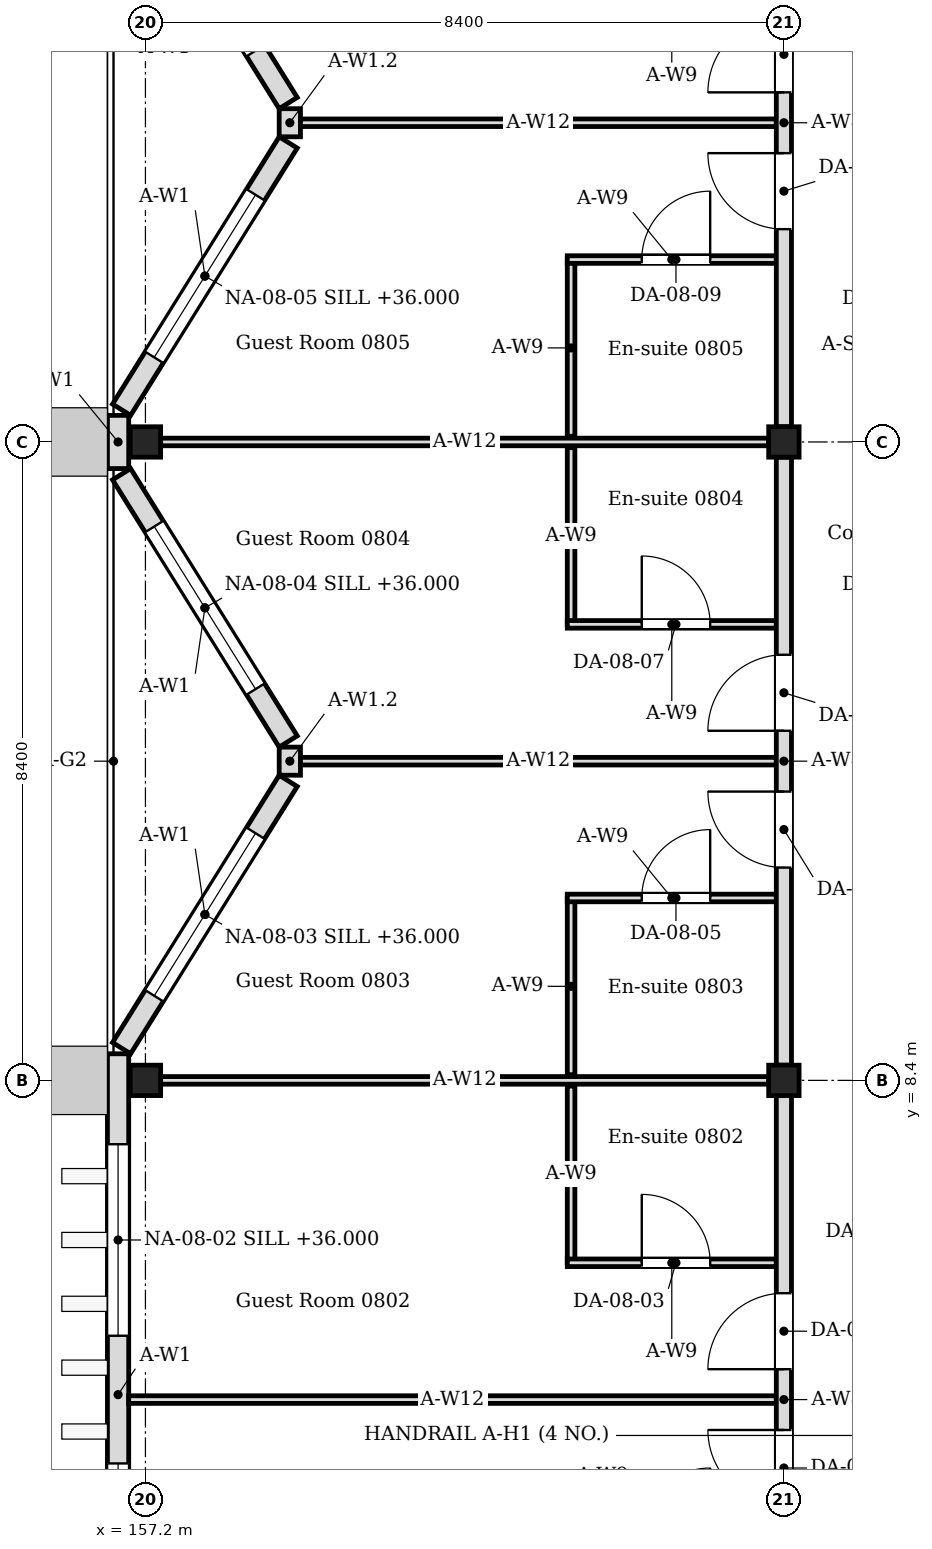
"""IFC4 building model, lengths in metres.
Left out: names, types, materials, properties, quantities, classifications, styles, units other than length and angle.
Written with IfcOpenShell. Run it as: python <this file> out.ifc"""

import sys

from ifc_helpers import new_model, si_unit, direction, frame, frame_2d, origin, origin_2d, place, context, subcontext, project, spatial, rectangle, i_section, extrude, element, fill, save


model = new_model("IFC4")
c1 = context("Model", 3, precision=1e-05, world=origin(), true_north=direction((0.0, 1.0)))
c2 = subcontext(c1, "Body", "Model", "MODEL_VIEW")
j1 = project(units=[si_unit("LENGTHUNIT", "METRE"), si_unit("PLANEANGLEUNIT", "RADIAN")], contexts=[c1])
p1 = place(None, origin())
s1 = spatial("IfcSite", under=j1, at=p1, CompositionType="ELEMENT")
p2 = place(p1, origin())
s2 = spatial("IfcBuilding", under=s1, at=p2, CompositionType="ELEMENT")
p3 = place(p2, frame((0.0, 0.0, 35.4)))
s3 = spatial("IfcBuildingStorey", under=s2, at=p3, CompositionType="ELEMENT", Elevation=35.4)
for number, where, z_axis, x_axis in (
    (1, (157.2, 8.4, 0.0), (0.0, 0.0, 1.0), (1.0, 0.0, 0.0)),
    (2, (157.2, 16.8, 0.0), (0.0, 0.0, 1.0), (1.0, 0.0, 0.0)),
    (3, (165.6, 8.4, 0.0), (0.0, 0.0, 1.0), (1.0, 0.0, 0.0)),
    (4, (165.6, 16.8, 0.0), (0.0, 0.0, 1.0), (1.0, 0.0, 0.0)),
):
    element("IfcColumn", number, at=place(p3, frame(where, z_axis=z_axis, x_axis=x_axis)), inside=s3, PredefinedType="COLUMN", context=c2, shape_type="SweptSolid", body=[
        extrude(i_section(OverallWidth=0.4, OverallDepth=0.4, WebThickness=0.013, FlangeThickness=0.021, FilletRadius=0.022, at=origin_2d()), origin(), (0.0, 0.0, 1.0), 4.2),
    ])
p4 = place(p3, frame((156.84, -0.22, 0.0), z_axis=(0.0, 0.0, 1.0), x_axis=(0.0, 1.0, 0.0)))
e5 = element("IfcWall", 5, at=p4, inside=s3, PredefinedType="SOLIDWALL", context=c2, shape_type="SweptSolid", body=[
    extrude(rectangle(XDim=8.97, YDim=0.28, at=frame_2d((4.485, 0.0))), origin(), (0.0, 0.0, 1.0), 4.05),
])
p5 = place(p4, frame((1.06, 0.0, 0.6)))
e6 = element("IfcOpeningElement", 6, at=p5, cuts=e5, PredefinedType="OPENING", context=c2, shape_type="SweptSolid", body=[
    extrude(rectangle(XDim=2.52, YDim=2.4, at=frame_2d((1.26, 1.2))), frame((0.0, 0.15, 0.0), z_axis=(0.0, -1.0, 0.0), x_axis=(1.0, 0.0, 0.0)), (0.0, 0.0, 1.0), 0.3),
])
p6 = place(p4, frame((5.26, 0.0, 0.6)))
e7 = element("IfcOpeningElement", 7, at=p6, cuts=e5, PredefinedType="OPENING", context=c2, shape_type="SweptSolid", body=[
    extrude(rectangle(XDim=2.52, YDim=2.4, at=frame_2d((1.26, 1.2))), frame((0.0, 0.15, 0.0), z_axis=(0.0, -1.0, 0.0), x_axis=(1.0, 0.0, 0.0)), (0.0, 0.0, 1.0), 0.3),
])
p7 = place(p3, frame((156.886, 8.824, 0.0), z_axis=(0.0, 0.0, 1.0), x_axis=(0.529018946142, 0.848610013271, 0.0)))
e8 = element("IfcWall", 8, at=p7, inside=s3, PredefinedType="SOLIDWALL", context=c2, shape_type="SweptSolid", body=[
    extrude(rectangle(XDim=4.144, YDim=0.28, at=frame_2d((2.072, 0.0))), origin(), (0.0, 0.0, 1.0), 4.05),
])
p8 = place(p7, frame((0.812, 0.0, 0.6)))
e9 = element("IfcOpeningElement", 9, at=p8, cuts=e8, PredefinedType="OPENING", context=c2, shape_type="SweptSolid", body=[
    extrude(rectangle(XDim=2.52, YDim=2.4, at=frame_2d((1.26, 1.2))), frame((0.0, 0.15, 0.0), z_axis=(0.0, -1.0, 0.0), x_axis=(1.0, 0.0, 0.0)), (0.0, 0.0, 1.0), 0.3),
])
p9 = place(p3, frame((159.079, 12.859, 0.0), z_axis=(0.0, 0.0, 1.0), x_axis=(-0.528992500338, 0.848626498871, 0.0)))
e10 = element("IfcWall", 10, at=p9, inside=s3, PredefinedType="SOLIDWALL", context=c2, shape_type="SweptSolid", body=[
    extrude(rectangle(XDim=4.145, YDim=0.28, at=frame_2d((2.072, 0.0))), origin(), (0.0, 0.0, 1.0), 4.05),
])
p10 = place(p9, frame((0.812, 0.0, 0.6)))
e11 = element("IfcOpeningElement", 11, at=p10, cuts=e10, PredefinedType="OPENING", context=c2, shape_type="SweptSolid", body=[
    extrude(rectangle(XDim=2.52, YDim=2.4, at=frame_2d((1.26, 1.2))), frame((0.0, 0.15, 0.0), z_axis=(0.0, -1.0, 0.0), x_axis=(1.0, 0.0, 0.0)), (0.0, 0.0, 1.0), 0.3),
])
p11 = place(p3, frame((159.1, 12.415, 0.0), z_axis=(0.0, 0.0, 1.0), x_axis=(0.0, 1.0, 0.0)))
e12 = element("IfcWall", 12, at=p11, inside=s3, PredefinedType="SOLIDWALL", context=c2, shape_type="SweptSolid", body=[
    extrude(rectangle(XDim=0.37, YDim=0.28, at=frame_2d((0.185, 0.0))), origin(), (0.0, 0.0, 1.0), 3.604),
])
p12 = place(p3, frame((156.84, 16.45, 0.0), z_axis=(0.0, 0.0, 1.0), x_axis=(0.0, 1.0, 0.0)))
e13 = element("IfcWall", 13, at=p12, inside=s3, PredefinedType="SOLIDWALL", context=c2, shape_type="SweptSolid", body=[
    extrude(rectangle(XDim=0.7, YDim=0.28, at=frame_2d((0.35, 0.0))), origin(), (0.0, 0.0, 1.0), 4.05),
])
p13 = place(p3, frame((156.886, 17.224, 0.0), z_axis=(0.0, 0.0, 1.0), x_axis=(0.529018946142, 0.848610013271, 0.0)))
e14 = element("IfcWall", 14, at=p13, inside=s3, PredefinedType="SOLIDWALL", context=c2, shape_type="SweptSolid", body=[
    extrude(rectangle(XDim=4.144, YDim=0.28, at=frame_2d((2.072, 0.0))), origin(), (0.0, 0.0, 1.0), 4.05),
])
p14 = place(p13, frame((0.812, 0.0, 0.6)))
e15 = element("IfcOpeningElement", 15, at=p14, cuts=e14, PredefinedType="OPENING", context=c2, shape_type="SweptSolid", body=[
    extrude(rectangle(XDim=2.52, YDim=2.4, at=frame_2d((1.26, 1.2))), frame((0.0, 0.15, 0.0), z_axis=(0.0, -1.0, 0.0), x_axis=(1.0, 0.0, 0.0)), (0.0, 0.0, 1.0), 0.3),
])
p15 = place(p3, frame((159.079, 21.259, 0.0), z_axis=(0.0, 0.0, 1.0), x_axis=(-0.529018946142, 0.848610013271, 0.0)))
e16 = element("IfcWall", 16, at=p15, inside=s3, PredefinedType="SOLIDWALL", context=c2, shape_type="SweptSolid", body=[
    extrude(rectangle(XDim=4.144, YDim=0.28, at=frame_2d((2.072, 0.0))), origin(), (0.0, 0.0, 1.0), 4.05),
])
p16 = place(p15, frame((0.812, 0.0, 0.6)))
e17 = element("IfcOpeningElement", 17, at=p16, cuts=e16, PredefinedType="OPENING", context=c2, shape_type="SweptSolid", body=[
    extrude(rectangle(XDim=2.52, YDim=2.4, at=frame_2d((1.26, 1.2))), frame((0.0, 0.15, 0.0), z_axis=(0.0, -1.0, 0.0), x_axis=(1.0, 0.0, 0.0)), (0.0, 0.0, 1.0), 0.3),
])
p17 = place(p3, frame((159.1, 20.815, 0.0), z_axis=(0.0, 0.0, 1.0), x_axis=(0.0, 1.0, 0.0)))
e18 = element("IfcWall", 18, at=p17, inside=s3, PredefinedType="SOLIDWALL", context=c2, shape_type="SweptSolid", body=[
    extrude(rectangle(XDim=0.37, YDim=0.28, at=frame_2d((0.185, 0.0))), origin(), (0.0, 0.0, 1.0), 3.604),
])
p18 = place(p3, frame((162.8, 6.0, 0.0), z_axis=(0.0, 0.0, 1.0), x_axis=(0.0, 1.0, 0.0)))
e19 = element("IfcWall", 19, at=p18, inside=s3, PredefinedType="PARTITIONING", context=c2, shape_type="SweptSolid", body=[
    extrude(rectangle(XDim=2.325, YDim=0.1, at=frame_2d((1.163, 0.0))), origin(), (0.0, 0.0, 1.0), 4.05),
])
p19 = place(p3, frame((162.75, 6.0, 0.0), z_axis=(0.0, 0.0, 1.0), x_axis=(1.0, 0.0, 0.0)))
e20 = element("IfcWall", 20, at=p19, inside=s3, PredefinedType="PARTITIONING", context=c2, shape_type="SweptSolid", body=[
    extrude(rectangle(XDim=2.75, YDim=0.1, at=frame_2d((1.375, 0.0))), origin(), (0.0, 0.0, 1.0), 4.05),
])
p20 = place(p19, frame((0.98, 0.0, 0.0)))
e21 = element("IfcOpeningElement", 21, at=p20, cuts=e20, PredefinedType="OPENING", context=c2, shape_type="SweptSolid", body=[
    extrude(rectangle(XDim=0.9, YDim=2.1, at=frame_2d((0.45, 1.05))), frame((0.0, 0.06, 0.0), z_axis=(0.0, -1.0, 0.0), x_axis=(1.0, 0.0, 0.0)), (0.0, 0.0, 1.0), 0.12),
])
p21 = place(p3, frame((162.8, 8.475, 0.0), z_axis=(0.0, 0.0, 1.0), x_axis=(0.0, 1.0, 0.0)))
e22 = element("IfcWall", 22, at=p21, inside=s3, PredefinedType="PARTITIONING", context=c2, shape_type="SweptSolid", body=[
    extrude(rectangle(XDim=2.325, YDim=0.1, at=frame_2d((1.163, 0.0))), origin(), (0.0, 0.0, 1.0), 4.05),
])
p22 = place(p3, frame((162.75, 10.8, 0.0), z_axis=(0.0, 0.0, 1.0), x_axis=(1.0, 0.0, 0.0)))
e23 = element("IfcWall", 23, at=p22, inside=s3, PredefinedType="PARTITIONING", context=c2, shape_type="SweptSolid", body=[
    extrude(rectangle(XDim=2.75, YDim=0.1, at=frame_2d((1.375, 0.0))), origin(), (0.0, 0.0, 1.0), 4.05),
])
p23 = place(p22, frame((0.98, 0.0, 0.0)))
e24 = element("IfcOpeningElement", 24, at=p23, cuts=e23, PredefinedType="OPENING", context=c2, shape_type="SweptSolid", body=[
    extrude(rectangle(XDim=0.9, YDim=2.1, at=frame_2d((0.45, 1.05))), frame((0.0, 0.06, 0.0), z_axis=(0.0, -1.0, 0.0), x_axis=(1.0, 0.0, 0.0)), (0.0, 0.0, 1.0), 0.12),
])
p24 = place(p3, frame((162.8, 14.4, 0.0), z_axis=(0.0, 0.0, 1.0), x_axis=(0.0, 1.0, 0.0)))
e25 = element("IfcWall", 25, at=p24, inside=s3, PredefinedType="PARTITIONING", context=c2, shape_type="SweptSolid", body=[
    extrude(rectangle(XDim=2.325, YDim=0.1, at=frame_2d((1.163, 0.0))), origin(), (0.0, 0.0, 1.0), 4.05),
])
p25 = place(p3, frame((162.75, 14.4, 0.0), z_axis=(0.0, 0.0, 1.0), x_axis=(1.0, 0.0, 0.0)))
e26 = element("IfcWall", 26, at=p25, inside=s3, PredefinedType="PARTITIONING", context=c2, shape_type="SweptSolid", body=[
    extrude(rectangle(XDim=2.75, YDim=0.1, at=frame_2d((1.375, 0.0))), origin(), (0.0, 0.0, 1.0), 4.05),
])
p26 = place(p25, frame((0.98, 0.0, 0.0)))
e27 = element("IfcOpeningElement", 27, at=p26, cuts=e26, PredefinedType="OPENING", context=c2, shape_type="SweptSolid", body=[
    extrude(rectangle(XDim=0.9, YDim=2.1, at=frame_2d((0.45, 1.05))), frame((0.0, 0.06, 0.0), z_axis=(0.0, -1.0, 0.0), x_axis=(1.0, 0.0, 0.0)), (0.0, 0.0, 1.0), 0.12),
])
p27 = place(p3, frame((162.8, 16.875, 0.0), z_axis=(0.0, 0.0, 1.0), x_axis=(0.0, 1.0, 0.0)))
e28 = element("IfcWall", 28, at=p27, inside=s3, PredefinedType="PARTITIONING", context=c2, shape_type="SweptSolid", body=[
    extrude(rectangle(XDim=2.325, YDim=0.1, at=frame_2d((1.163, 0.0))), origin(), (0.0, 0.0, 1.0), 4.05),
])
p28 = place(p3, frame((162.75, 19.2, 0.0), z_axis=(0.0, 0.0, 1.0), x_axis=(1.0, 0.0, 0.0)))
e29 = element("IfcWall", 29, at=p28, inside=s3, PredefinedType="PARTITIONING", context=c2, shape_type="SweptSolid", body=[
    extrude(rectangle(XDim=2.75, YDim=0.1, at=frame_2d((1.375, 0.0))), origin(), (0.0, 0.0, 1.0), 4.05),
])
p29 = place(p28, frame((0.98, 0.0, 0.0)))
e30 = element("IfcOpeningElement", 30, at=p29, cuts=e29, PredefinedType="OPENING", context=c2, shape_type="SweptSolid", body=[
    extrude(rectangle(XDim=0.9, YDim=2.1, at=frame_2d((0.45, 1.05))), frame((0.0, 0.06, 0.0), z_axis=(0.0, -1.0, 0.0), x_axis=(1.0, 0.0, 0.0)), (0.0, 0.0, 1.0), 0.12),
])
for number, where, z_axis, x_axis in (
    (31, (157.4, 8.4, 0.0), (0.0, 0.0, 1.0), (1.0, 0.0, 0.0)),
    (32, (157.4, 16.8, 0.0), (0.0, 0.0, 1.0), (1.0, 0.0, 0.0)),
):
    element("IfcWall", number, at=place(p3, frame(where, z_axis=z_axis, x_axis=x_axis)), inside=s3, PredefinedType="PARTITIONING", context=c2, shape_type="SweptSolid", body=[
        extrude(rectangle(XDim=8.0, YDim=0.1, at=frame_2d((4.0, 0.0))), origin(), (0.0, 0.0, 1.0), 3.604),
    ])
p30 = place(p3, frame((156.98, 4.2, 0.0), z_axis=(0.0, 0.0, 1.0), x_axis=(1.0, 0.0, 0.0)))
e33 = element("IfcWall", 33, at=p30, inside=s3, PredefinedType="PARTITIONING", context=c2, shape_type="SweptSolid", body=[
    extrude(rectangle(XDim=8.52, YDim=0.1, at=frame_2d((4.26, 0.0))), origin(), (0.0, 0.0, 1.0), 3.604),
])
for number, where, z_axis, x_axis in (
    (34, (159.24, 12.6, 0.0), (0.0, 0.0, 1.0), (1.0, 0.0, 0.0)),
    (35, (159.24, 21.0, 0.0), (0.0, 0.0, 1.0), (1.0, 0.0, 0.0)),
):
    element("IfcWall", number, at=place(p3, frame(where, z_axis=z_axis, x_axis=x_axis)), inside=s3, PredefinedType="PARTITIONING", context=c2, shape_type="SweptSolid", body=[
        extrude(rectangle(XDim=6.26, YDim=0.1, at=frame_2d((3.13, 0.0))), origin(), (0.0, 0.0, 1.0), 3.604),
    ])
p31 = place(p3, frame((165.6, 0.2, 0.0), z_axis=(0.0, 0.0, 1.0), x_axis=(0.0, 1.0, 0.0)))
e36 = element("IfcWall", 36, at=p31, inside=s3, PredefinedType="PARTITIONING", context=c2, shape_type="SweptSolid", body=[
    extrude(rectangle(XDim=8.0, YDim=0.2, at=frame_2d((4.0, 0.0))), origin(), (0.0, 0.0, 1.0), 3.45),
])
p32 = place(p31, frame((2.6, 0.0, 0.0)))
e37 = element("IfcOpeningElement", 37, at=p32, cuts=e36, PredefinedType="OPENING", context=c2, shape_type="SweptSolid", body=[
    extrude(rectangle(XDim=1.0, YDim=2.4, at=frame_2d((0.5, 1.2))), frame((0.0, 0.11, 0.0), z_axis=(0.0, -1.0, 0.0), x_axis=(1.0, 0.0, 0.0)), (0.0, 0.0, 1.0), 0.22),
])
p33 = place(p31, frame((4.4, 0.0, 0.0)))
e38 = element("IfcOpeningElement", 38, at=p33, cuts=e36, PredefinedType="OPENING", context=c2, shape_type="SweptSolid", body=[
    extrude(rectangle(XDim=1.0, YDim=2.4, at=frame_2d((0.5, 1.2))), frame((0.0, 0.11, 0.0), z_axis=(0.0, -1.0, 0.0), x_axis=(1.0, 0.0, 0.0)), (0.0, 0.0, 1.0), 0.22),
])
p34 = place(p3, frame((165.6, 8.6, 0.0), z_axis=(0.0, 0.0, 1.0), x_axis=(0.0, 1.0, 0.0)))
e39 = element("IfcWall", 39, at=p34, inside=s3, PredefinedType="PARTITIONING", context=c2, shape_type="SweptSolid", body=[
    extrude(rectangle(XDim=8.0, YDim=0.2, at=frame_2d((4.0, 0.0))), origin(), (0.0, 0.0, 1.0), 3.45),
])
p35 = place(p34, frame((2.6, 0.0, 0.0)))
e40 = element("IfcOpeningElement", 40, at=p35, cuts=e39, PredefinedType="OPENING", context=c2, shape_type="SweptSolid", body=[
    extrude(rectangle(XDim=1.0, YDim=2.4, at=frame_2d((0.5, 1.2))), frame((0.0, 0.11, 0.0), z_axis=(0.0, -1.0, 0.0), x_axis=(1.0, 0.0, 0.0)), (0.0, 0.0, 1.0), 0.22),
])
p36 = place(p34, frame((4.4, 0.0, 0.0)))
e41 = element("IfcOpeningElement", 41, at=p36, cuts=e39, PredefinedType="OPENING", context=c2, shape_type="SweptSolid", body=[
    extrude(rectangle(XDim=1.0, YDim=2.4, at=frame_2d((0.5, 1.2))), frame((0.0, 0.11, 0.0), z_axis=(0.0, -1.0, 0.0), x_axis=(1.0, 0.0, 0.0)), (0.0, 0.0, 1.0), 0.22),
])
p37 = place(p3, frame((165.6, 17.0, 0.0), z_axis=(0.0, 0.0, 1.0), x_axis=(0.0, 1.0, 0.0)))
e42 = element("IfcWall", 42, at=p37, inside=s3, PredefinedType="PARTITIONING", context=c2, shape_type="SweptSolid", body=[
    extrude(rectangle(XDim=8.0, YDim=0.2, at=frame_2d((4.0, 0.0))), origin(), (0.0, 0.0, 1.0), 3.45),
])
p38 = place(p37, frame((2.6, 0.0, 0.0)))
e43 = element("IfcOpeningElement", 43, at=p38, cuts=e42, PredefinedType="OPENING", context=c2, shape_type="SweptSolid", body=[
    extrude(rectangle(XDim=1.0, YDim=2.4, at=frame_2d((0.5, 1.2))), frame((0.0, 0.11, 0.0), z_axis=(0.0, -1.0, 0.0), x_axis=(1.0, 0.0, 0.0)), (0.0, 0.0, 1.0), 0.22),
])
p39 = place(p37, frame((4.4, 0.0, 0.0)))
e44 = element("IfcOpeningElement", 44, at=p39, cuts=e42, PredefinedType="OPENING", context=c2, shape_type="SweptSolid", body=[
    extrude(rectangle(XDim=1.0, YDim=2.4, at=frame_2d((0.5, 1.2))), frame((0.0, 0.11, 0.0), z_axis=(0.0, -1.0, 0.0), x_axis=(1.0, 0.0, 0.0)), (0.0, 0.0, 1.0), 0.22),
])
p40 = place(p5, origin())
e45 = element("IfcWindow", 45, at=p40, inside=s3, PartitioningType="SINGLE_PANEL", PredefinedType="WINDOW", context=c2, shape_type="SweptSolid", body=[
    extrude(rectangle(XDim=2.52, YDim=2.4, at=frame_2d((1.26, 1.2))), frame((0.0, 0.03, 0.0), z_axis=(0.0, -1.0, 0.0), x_axis=(1.0, 0.0, 0.0)), (0.0, 0.0, 1.0), 0.06),
])
fill(e6, e45)
p41 = place(p6, origin())
e46 = element("IfcWindow", 46, at=p41, inside=s3, PartitioningType="SINGLE_PANEL", PredefinedType="WINDOW", context=c2, shape_type="SweptSolid", body=[
    extrude(rectangle(XDim=2.52, YDim=2.4, at=frame_2d((1.26, 1.2))), frame((0.0, 0.03, 0.0), z_axis=(0.0, -1.0, 0.0), x_axis=(1.0, 0.0, 0.0)), (0.0, 0.0, 1.0), 0.06),
])
fill(e7, e46)
p42 = place(p8, origin())
e47 = element("IfcWindow", 47, at=p42, inside=s3, PartitioningType="SINGLE_PANEL", PredefinedType="WINDOW", context=c2, shape_type="SweptSolid", body=[
    extrude(rectangle(XDim=2.52, YDim=2.4, at=frame_2d((1.26, 1.2))), frame((0.0, 0.03, 0.0), z_axis=(0.0, -1.0, 0.0), x_axis=(1.0, 0.0, 0.0)), (0.0, 0.0, 1.0), 0.06),
])
fill(e9, e47)
p43 = place(p10, origin())
e48 = element("IfcWindow", 48, at=p43, inside=s3, PartitioningType="SINGLE_PANEL", PredefinedType="WINDOW", context=c2, shape_type="SweptSolid", body=[
    extrude(rectangle(XDim=2.52, YDim=2.4, at=frame_2d((1.26, 1.2))), frame((0.0, 0.03, 0.0), z_axis=(0.0, -1.0, 0.0), x_axis=(1.0, 0.0, 0.0)), (0.0, 0.0, 1.0), 0.06),
])
fill(e11, e48)
p44 = place(p14, origin())
e49 = element("IfcWindow", 49, at=p44, inside=s3, PartitioningType="SINGLE_PANEL", PredefinedType="WINDOW", context=c2, shape_type="SweptSolid", body=[
    extrude(rectangle(XDim=2.52, YDim=2.4, at=frame_2d((1.26, 1.2))), frame((0.0, 0.03, 0.0), z_axis=(0.0, -1.0, 0.0), x_axis=(1.0, 0.0, 0.0)), (0.0, 0.0, 1.0), 0.06),
])
fill(e15, e49)
p45 = place(p32, origin())
e50 = element("IfcDoor", 50, at=p45, inside=s3, OperationType="SINGLE_SWING_RIGHT", PredefinedType="DOOR", context=c2, shape_type="SweptSolid", body=[
    extrude(rectangle(XDim=1.0, YDim=2.4, at=frame_2d((0.5, 1.2))), frame((0.0, 0.025, 0.0), z_axis=(0.0, -1.0, 0.0), x_axis=(1.0, 0.0, 0.0)), (0.0, 0.0, 1.0), 0.05),
])
fill(e37, e50)
p46 = place(p20, origin())
e51 = element("IfcDoor", 51, at=p46, inside=s3, OperationType="SINGLE_SWING_LEFT", PredefinedType="DOOR", context=c2, shape_type="SweptSolid", body=[
    extrude(rectangle(XDim=0.9, YDim=2.1, at=frame_2d((0.45, 1.05))), frame((0.0, 0.025, 0.0), z_axis=(0.0, -1.0, 0.0), x_axis=(1.0, 0.0, 0.0)), (0.0, 0.0, 1.0), 0.05),
])
fill(e21, e51)
p47 = place(p33, origin())
e52 = element("IfcDoor", 52, at=p47, inside=s3, OperationType="SINGLE_SWING_LEFT", PredefinedType="DOOR", context=c2, shape_type="SweptSolid", body=[
    extrude(rectangle(XDim=1.0, YDim=2.4, at=frame_2d((0.5, 1.2))), frame((0.0, 0.025, 0.0), z_axis=(0.0, -1.0, 0.0), x_axis=(1.0, 0.0, 0.0)), (0.0, 0.0, 1.0), 0.05),
])
fill(e38, e52)
p48 = place(p23, origin())
e53 = element("IfcDoor", 53, at=p48, inside=s3, OperationType="SINGLE_SWING_RIGHT", PredefinedType="DOOR", context=c2, shape_type="SweptSolid", body=[
    extrude(rectangle(XDim=0.9, YDim=2.1, at=frame_2d((0.45, 1.05))), frame((0.0, 0.025, 0.0), z_axis=(0.0, -1.0, 0.0), x_axis=(1.0, 0.0, 0.0)), (0.0, 0.0, 1.0), 0.05),
])
fill(e24, e53)
p49 = place(p35, origin())
e54 = element("IfcDoor", 54, at=p49, inside=s3, OperationType="SINGLE_SWING_RIGHT", PredefinedType="DOOR", context=c2, shape_type="SweptSolid", body=[
    extrude(rectangle(XDim=1.0, YDim=2.4, at=frame_2d((0.5, 1.2))), frame((0.0, 0.025, 0.0), z_axis=(0.0, -1.0, 0.0), x_axis=(1.0, 0.0, 0.0)), (0.0, 0.0, 1.0), 0.05),
])
fill(e40, e54)
p50 = place(p26, origin())
e55 = element("IfcDoor", 55, at=p50, inside=s3, OperationType="SINGLE_SWING_LEFT", PredefinedType="DOOR", context=c2, shape_type="SweptSolid", body=[
    extrude(rectangle(XDim=0.9, YDim=2.1, at=frame_2d((0.45, 1.05))), frame((0.0, 0.025, 0.0), z_axis=(0.0, -1.0, 0.0), x_axis=(1.0, 0.0, 0.0)), (0.0, 0.0, 1.0), 0.05),
])
fill(e27, e55)
p51 = place(p36, origin())
e56 = element("IfcDoor", 56, at=p51, inside=s3, OperationType="SINGLE_SWING_LEFT", PredefinedType="DOOR", context=c2, shape_type="SweptSolid", body=[
    extrude(rectangle(XDim=1.0, YDim=2.4, at=frame_2d((0.5, 1.2))), frame((0.0, 0.025, 0.0), z_axis=(0.0, -1.0, 0.0), x_axis=(1.0, 0.0, 0.0)), (0.0, 0.0, 1.0), 0.05),
])
fill(e41, e56)
p52 = place(p29, origin())
e57 = element("IfcDoor", 57, at=p52, inside=s3, OperationType="SINGLE_SWING_RIGHT", PredefinedType="DOOR", context=c2, shape_type="SweptSolid", body=[
    extrude(rectangle(XDim=0.9, YDim=2.1, at=frame_2d((0.45, 1.05))), frame((0.0, 0.025, 0.0), z_axis=(0.0, -1.0, 0.0), x_axis=(1.0, 0.0, 0.0)), (0.0, 0.0, 1.0), 0.05),
])
fill(e30, e57)
p53 = place(p38, origin())
e58 = element("IfcDoor", 58, at=p53, inside=s3, OperationType="SINGLE_SWING_RIGHT", PredefinedType="DOOR", context=c2, shape_type="SweptSolid", body=[
    extrude(rectangle(XDim=1.0, YDim=2.4, at=frame_2d((0.5, 1.2))), frame((0.0, 0.025, 0.0), z_axis=(0.0, -1.0, 0.0), x_axis=(1.0, 0.0, 0.0)), (0.0, 0.0, 1.0), 0.05),
])
fill(e43, e58)
p54 = place(p39, origin())
e59 = element("IfcDoor", 59, at=p54, inside=s3, OperationType="SINGLE_SWING_LEFT", PredefinedType="DOOR", context=c2, shape_type="SweptSolid", body=[
    extrude(rectangle(XDim=1.0, YDim=2.4, at=frame_2d((0.5, 1.2))), frame((0.0, 0.025, 0.0), z_axis=(0.0, -1.0, 0.0), x_axis=(1.0, 0.0, 0.0)), (0.0, 0.0, 1.0), 0.05),
])
fill(e44, e59)
save(model, sys.argv[1])
